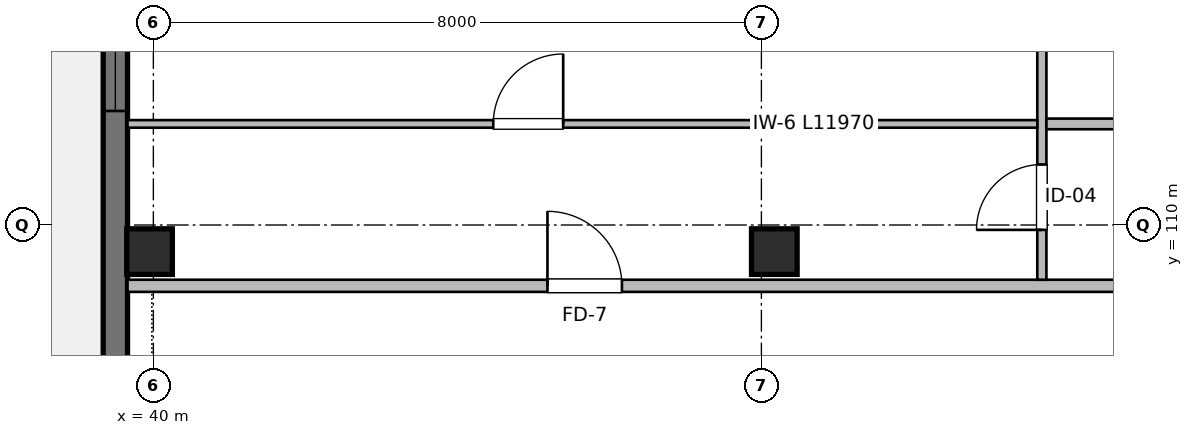
"""IFC4 building model, lengths in metres.
Left out: names, types, materials, properties, quantities, classifications, styles, units other than length and angle.
Written with IfcOpenShell. Run it as: python <this file> out.ifc"""

import sys

from ifc_helpers import new_model, si_unit, direction, frame, frame_2d, origin, origin_2d, place, context, subcontext, project, spatial, rectangle, extrude, element, fill, save


model = new_model("IFC4")
c1 = context("Model", 3, precision=1e-05, world=origin(), true_north=direction((0.0, 1.0)))
c2 = subcontext(c1, "Body", "Model", "MODEL_VIEW")
j1 = project(units=[si_unit("LENGTHUNIT", "METRE"), si_unit("PLANEANGLEUNIT", "RADIAN")], contexts=[c1])
p1 = place(None, origin())
s1 = spatial("IfcSite", under=j1, at=p1, CompositionType="ELEMENT")
p2 = place(p1, origin())
s2 = spatial("IfcBuilding", under=s1, at=p2, CompositionType="ELEMENT")
p3 = place(p2, frame((0.0, 0.0, 16.96)))
s3 = spatial("IfcBuildingStorey", under=s2, at=p3, CompositionType="ELEMENT", Elevation=16.96)
for number, where, z_axis, x_axis in (
    (1, (39.95, 109.65, 0.0), (0.0, 0.0, 1.0), (1.0, 0.0, 0.0)),
    (2, (48.17, 109.65, 0.0), (0.0, 0.0, 1.0), (1.0, 0.0, 0.0)),
):
    element("IfcColumn", number, at=place(p3, frame(where, z_axis=z_axis, x_axis=x_axis)), inside=s3, PredefinedType="COLUMN", context=c2, shape_type="SweptSolid", body=[
        extrude(rectangle(XDim=0.6, YDim=0.6, at=origin_2d()), origin(), (0.0, 0.0, 1.0), 3.2),
    ])
p4 = place(p3, frame((39.5, 100.0, 0.0), z_axis=(0.0, 0.0, 1.0), x_axis=(0.0, 1.0, 0.0)))
e3 = element("IfcWall", 3, at=p4, inside=s3, PredefinedType="SHEAR", context=c2, shape_type="SweptSolid", body=[
    extrude(rectangle(XDim=16.0, YDim=0.32, at=frame_2d((8.0, 0.0))), origin(), (0.0, 0.0, 1.0), 2.98),
])
p5 = place(p4, frame((3.4, 0.0, 0.0)))
e4 = element("IfcOpeningElement", 4, at=p5, cuts=e3, PredefinedType="OPENING", context=c2, shape_type="SweptSolid", body=[
    extrude(rectangle(XDim=1.2, YDim=2.2, at=frame_2d((0.6, 1.1))), frame((0.0, 0.17, 0.0), z_axis=(0.0, -1.0, 0.0), x_axis=(1.0, 0.0, 0.0)), (0.0, 0.0, 1.0), 0.34),
])
p6 = place(p4, frame((4.85, 0.0, 0.72)))
e5 = element("IfcOpeningElement", 5, at=p6, cuts=e3, PredefinedType="OPENING", context=c2, shape_type="SweptSolid", body=[
    extrude(rectangle(XDim=1.68, YDim=1.5, at=frame_2d((0.84, 0.75))), frame((0.0, 0.17, 0.0), z_axis=(0.0, -1.0, 0.0), x_axis=(1.0, 0.0, 0.0)), (0.0, 0.0, 1.0), 0.34),
])
p7 = place(p4, frame((11.5, 0.0, 0.47)))
e6 = element("IfcOpeningElement", 6, at=p7, cuts=e3, PredefinedType="OPENING", context=c2, shape_type="SweptSolid", body=[
    extrude(rectangle(XDim=2.7, YDim=1.75, at=frame_2d((1.35, 0.875))), frame((0.0, 0.17, 0.0), z_axis=(0.0, -1.0, 0.0), x_axis=(1.0, 0.0, 0.0)), (0.0, 0.0, 1.0), 0.34),
])
p8 = place(p3, frame((39.66, 109.2, 0.0), z_axis=(0.0, 0.0, 1.0), x_axis=(1.0, 0.0, 0.0)))
e7 = element("IfcWall", 7, at=p8, inside=s3, PredefinedType="PARTITIONING", context=c2, shape_type="SweptSolid", body=[
    extrude(rectangle(XDim=41.68, YDim=0.16, at=frame_2d((20.84, 0.0))), origin(), (0.0, 0.0, 1.0), 2.935),
])
p9 = place(p8, frame((5.525, 0.0, 0.0)))
e8 = element("IfcOpeningElement", 8, at=p9, cuts=e7, PredefinedType="OPENING", context=c2, shape_type="SweptSolid", body=[
    extrude(rectangle(XDim=0.98, YDim=2.15, at=frame_2d((0.49, 1.075))), frame((0.0, 0.09, 0.0), z_axis=(0.0, -1.0, 0.0), x_axis=(1.0, 0.0, 0.0)), (0.0, 0.0, 1.0), 0.18),
])
p10 = place(p8, frame((26.455, 0.0, 0.0)))
e9 = element("IfcOpeningElement", 9, at=p10, cuts=e7, PredefinedType="OPENING", context=c2, shape_type="SweptSolid", body=[
    extrude(rectangle(XDim=0.98, YDim=2.15, at=frame_2d((0.49, 1.075))), frame((0.0, 0.09, 0.0), z_axis=(0.0, -1.0, 0.0), x_axis=(1.0, 0.0, 0.0)), (0.0, 0.0, 1.0), 0.18),
])
p11 = place(p3, frame((51.69, 109.28, 0.0), z_axis=(0.0, 0.0, 1.0), x_axis=(0.0, 1.0, 0.0)))
e10 = element("IfcWall", 10, at=p11, inside=s3, PredefinedType="PARTITIONING", context=c2, shape_type="SweptSolid", body=[
    extrude(rectangle(XDim=6.59, YDim=0.12, at=frame_2d((3.295, 0.0))), origin(), (0.0, 0.0, 1.0), 2.935),
])
p12 = place(p11, frame((0.656, 0.0, 0.0)))
e11 = element("IfcOpeningElement", 11, at=p12, cuts=e10, PredefinedType="OPENING", context=c2, shape_type="SweptSolid", body=[
    extrude(rectangle(XDim=0.86, YDim=2.1, at=frame_2d((0.43, 1.05))), frame((0.0, 0.07, 0.0), z_axis=(0.0, -1.0, 0.0), x_axis=(1.0, 0.0, 0.0)), (0.0, 0.0, 1.0), 0.14),
])
p13 = place(p11, frame((4.093, 0.0, 0.0)))
e12 = element("IfcOpeningElement", 12, at=p13, cuts=e10, PredefinedType="OPENING", context=c2, shape_type="SweptSolid", body=[
    extrude(rectangle(XDim=0.9, YDim=2.1, at=frame_2d((0.45, 1.05))), frame((0.0, 0.07, 0.0), z_axis=(0.0, -1.0, 0.0), x_axis=(1.0, 0.0, 0.0)), (0.0, 0.0, 1.0), 0.14),
])
p14 = place(p3, frame((51.75, 111.33, 0.0), z_axis=(0.0, 0.0, 1.0), x_axis=(1.0, 0.0, 0.0)))
e13 = element("IfcWall", 13, at=p14, inside=s3, PredefinedType="PARTITIONING", context=c2, shape_type="SweptSolid", body=[
    extrude(rectangle(XDim=8.66, YDim=0.14, at=frame_2d((4.33, 0.0))), origin(), (0.0, 0.0, 1.0), 2.935),
])
p15 = place(p14, frame((3.488, 0.0, 0.0)))
e14 = element("IfcOpeningElement", 14, at=p15, cuts=e13, PredefinedType="OPENING", context=c2, shape_type="SweptSolid", body=[
    extrude(rectangle(XDim=0.85, YDim=2.05, at=frame_2d((0.425, 1.025))), frame((0.0, 0.08, 0.0), z_axis=(0.0, -1.0, 0.0), x_axis=(1.0, 0.0, 0.0)), (0.0, 0.0, 1.0), 0.16),
])
p16 = place(p3, frame((39.66, 111.33, 0.0), z_axis=(0.0, 0.0, 1.0), x_axis=(1.0, 0.0, 0.0)))
e15 = element("IfcWall", 15, at=p16, inside=s3, PredefinedType="PARTITIONING", context=c2, shape_type="SweptSolid", body=[
    extrude(rectangle(XDim=11.97, YDim=0.1, at=frame_2d((5.985, 0.0))), origin(), (0.0, 0.0, 1.0), 2.935),
])
p17 = place(p16, frame((4.812, 0.0, 0.0)))
e16 = element("IfcOpeningElement", 16, at=p17, cuts=e15, PredefinedType="OPENING", context=c2, shape_type="SweptSolid", body=[
    extrude(rectangle(XDim=0.92, YDim=2.1, at=frame_2d((0.46, 1.05))), frame((0.0, 0.06, 0.0), z_axis=(0.0, -1.0, 0.0), x_axis=(1.0, 0.0, 0.0)), (0.0, 0.0, 1.0), 0.12),
])
p18 = place(p7, origin())
e17 = element("IfcWindow", 17, at=p18, inside=s3, PartitioningType="SINGLE_PANEL", PredefinedType="WINDOW", context=c2, shape_type="SweptSolid", body=[
    extrude(rectangle(XDim=2.7, YDim=1.75, at=frame_2d((1.35, 0.875))), frame((0.0, 0.03, 0.0), z_axis=(0.0, -1.0, 0.0), x_axis=(1.0, 0.0, 0.0)), (0.0, 0.0, 1.0), 0.06),
])
fill(e6, e17)
p19 = place(p9, origin())
e18 = element("IfcDoor", 18, at=p19, inside=s3, OperationType="SINGLE_SWING_LEFT", PredefinedType="DOOR", context=c2, shape_type="SweptSolid", body=[
    extrude(rectangle(XDim=0.98, YDim=2.15, at=frame_2d((0.49, 1.075))), frame((0.0, 0.025, 0.0), z_axis=(0.0, -1.0, 0.0), x_axis=(1.0, 0.0, 0.0)), (0.0, 0.0, 1.0), 0.05),
])
fill(e8, e18)
p20 = place(p17, origin())
e19 = element("IfcDoor", 19, at=p20, inside=s3, OperationType="SINGLE_SWING_RIGHT", PredefinedType="DOOR", context=c2, shape_type="SweptSolid", body=[
    extrude(rectangle(XDim=0.92, YDim=2.1, at=frame_2d((0.46, 1.05))), frame((0.0, 0.025, 0.0), z_axis=(0.0, -1.0, 0.0), x_axis=(1.0, 0.0, 0.0)), (0.0, 0.0, 1.0), 0.05),
])
fill(e16, e19)
p21 = place(p12, origin())
e20 = element("IfcDoor", 20, at=p21, inside=s3, OperationType="SINGLE_SWING_LEFT", PredefinedType="DOOR", context=c2, shape_type="SweptSolid", body=[
    extrude(rectangle(XDim=0.86, YDim=2.1, at=frame_2d((0.43, 1.05))), frame((0.0, 0.025, 0.0), z_axis=(0.0, -1.0, 0.0), x_axis=(1.0, 0.0, 0.0)), (0.0, 0.0, 1.0), 0.05),
])
fill(e11, e20)
save(model, sys.argv[1])
